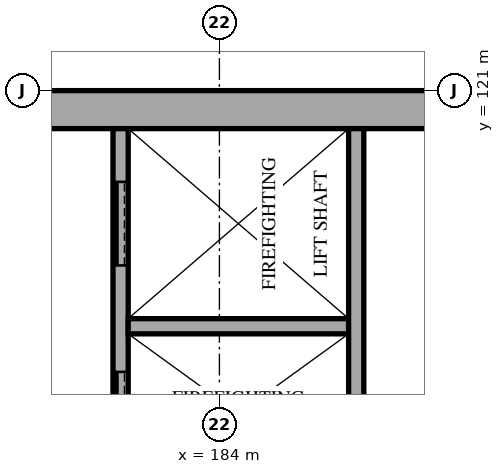
"""IFC4 building model, lengths in metres.
Left out: names, types, materials, properties, quantities, classifications, styles, units other than length and angle.
Written with IfcOpenShell. Run it as: python <this file> out.ifc"""

import sys

from ifc_helpers import new_model, si_unit, direction, frame, frame_2d, origin, place, context, subcontext, project, spatial, rectangle, extrude, element, fill, save


model = new_model("IFC4")
c1 = context("Model", 3, precision=1e-05, world=origin(), true_north=direction((0.0, 1.0)))
c2 = subcontext(c1, "Body", "Model", "MODEL_VIEW")
j1 = project(units=[si_unit("LENGTHUNIT", "METRE"), si_unit("PLANEANGLEUNIT", "RADIAN")], contexts=[c1])
p1 = place(None, origin())
s1 = spatial("IfcSite", under=j1, at=p1, CompositionType="ELEMENT")
p2 = place(p1, origin())
s2 = spatial("IfcBuilding", under=s1, at=p2, CompositionType="ELEMENT")
p3 = place(p2, frame((0.0, 0.0, -4.2)))
s3 = spatial("IfcBuildingStorey", under=s2, at=p3, CompositionType="ELEMENT", Elevation=-4.2)
p4 = place(p3, frame((172.0, 120.75, 0.0), z_axis=(0.0, 0.0, 1.0), x_axis=(1.0, 0.0, 0.0)))
e1 = element("IfcWall", 1, at=p4, inside=s3, PredefinedType="SHEAR", context=c2, shape_type="SweptSolid", body=[
    extrude(rectangle(XDim=18.0, YDim=0.5, at=frame_2d((9.0, 0.0))), origin(), (0.0, 0.0, 1.0), 4.2),
])
p5 = place(p4, frame((8.3, 0.0, 0.0)))
e2 = element("IfcOpeningElement", 2, at=p5, cuts=e1, PredefinedType="OPENING", context=c2, shape_type="SweptSolid", body=[
    extrude(rectangle(XDim=1.2, YDim=2.1, at=frame_2d((0.6, 1.05))), frame((0.0, 0.26, 0.0), z_axis=(0.0, -1.0, 0.0), x_axis=(1.0, 0.0, 0.0)), (0.0, 0.0, 1.0), 0.52),
])
p6 = place(p4, frame((15.2, 0.0, 0.0)))
e3 = element("IfcOpeningElement", 3, at=p6, cuts=e1, PredefinedType="OPENING", context=c2, shape_type="SweptSolid", body=[
    extrude(rectangle(XDim=1.0, YDim=2.1, at=frame_2d((0.5, 1.05))), frame((0.0, 0.26, 0.0), z_axis=(0.0, -1.0, 0.0), x_axis=(1.0, 0.0, 0.0)), (0.0, 0.0, 1.0), 0.52),
])
p7 = place(p3, frame((182.7, 115.7, 0.0), z_axis=(0.0, 0.0, 1.0), x_axis=(0.0, 1.0, 0.0)))
e4 = element("IfcWall", 4, at=p7, inside=s3, PredefinedType="SOLIDWALL", context=c2, shape_type="SweptSolid", body=[
    extrude(rectangle(XDim=4.8, YDim=0.2, at=frame_2d((2.4, 0.0))), origin(), (0.0, 0.0, 1.0), 4.0),
])
p8 = place(p7, frame((0.5, 0.0, 0.0)))
e5 = element("IfcOpeningElement", 5, at=p8, cuts=e4, PredefinedType="OPENING", context=c2, shape_type="SweptSolid", body=[
    extrude(rectangle(XDim=1.1, YDim=2.1, at=frame_2d((0.55, 1.05))), frame((0.0, 0.11, 0.0), z_axis=(0.0, -1.0, 0.0), x_axis=(1.0, 0.0, 0.0)), (0.0, 0.0, 1.0), 0.22),
])
p9 = place(p7, frame((3.0, 0.0, 0.0)))
e6 = element("IfcOpeningElement", 6, at=p9, cuts=e4, PredefinedType="OPENING", context=c2, shape_type="SweptSolid", body=[
    extrude(rectangle(XDim=1.1, YDim=2.1, at=frame_2d((0.55, 1.05))), frame((0.0, 0.11, 0.0), z_axis=(0.0, -1.0, 0.0), x_axis=(1.0, 0.0, 0.0)), (0.0, 0.0, 1.0), 0.22),
])
p10 = place(p3, frame((182.8, 117.9, 0.0), z_axis=(0.0, 0.0, 1.0), x_axis=(1.0, 0.0, 0.0)))
e7 = element("IfcWall", 7, at=p10, inside=s3, PredefinedType="SOLIDWALL", context=c2, shape_type="SweptSolid", body=[
    extrude(rectangle(XDim=2.9, YDim=0.2, at=frame_2d((1.45, 0.0))), origin(), (0.0, 0.0, 1.0), 4.0),
])
p11 = place(p3, frame((185.8, 115.7, 0.0), z_axis=(0.0, 0.0, 1.0), x_axis=(0.0, 1.0, 0.0)))
e8 = element("IfcWall", 8, at=p11, inside=s3, PredefinedType="SOLIDWALL", context=c2, shape_type="SweptSolid", body=[
    extrude(rectangle(XDim=4.8, YDim=0.2, at=frame_2d((2.4, 0.0))), origin(), (0.0, 0.0, 1.0), 4.0),
])
p12 = place(p8, origin())
e9 = element("IfcDoor", 9, at=p12, inside=s3, OperationType="SLIDING_TO_LEFT", PredefinedType="DOOR", context=c2, shape_type="SweptSolid", body=[
    extrude(rectangle(XDim=1.1, YDim=2.1, at=frame_2d((0.55, 1.05))), frame((0.0, 0.025, 0.0), z_axis=(0.0, -1.0, 0.0), x_axis=(1.0, 0.0, 0.0)), (0.0, 0.0, 1.0), 0.05),
])
fill(e5, e9)
p13 = place(p9, origin())
e10 = element("IfcDoor", 10, at=p13, inside=s3, OperationType="SLIDING_TO_LEFT", PredefinedType="DOOR", context=c2, shape_type="SweptSolid", body=[
    extrude(rectangle(XDim=1.1, YDim=2.1, at=frame_2d((0.55, 1.05))), frame((0.0, 0.025, 0.0), z_axis=(0.0, -1.0, 0.0), x_axis=(1.0, 0.0, 0.0)), (0.0, 0.0, 1.0), 0.05),
])
fill(e6, e10)
save(model, sys.argv[1])
